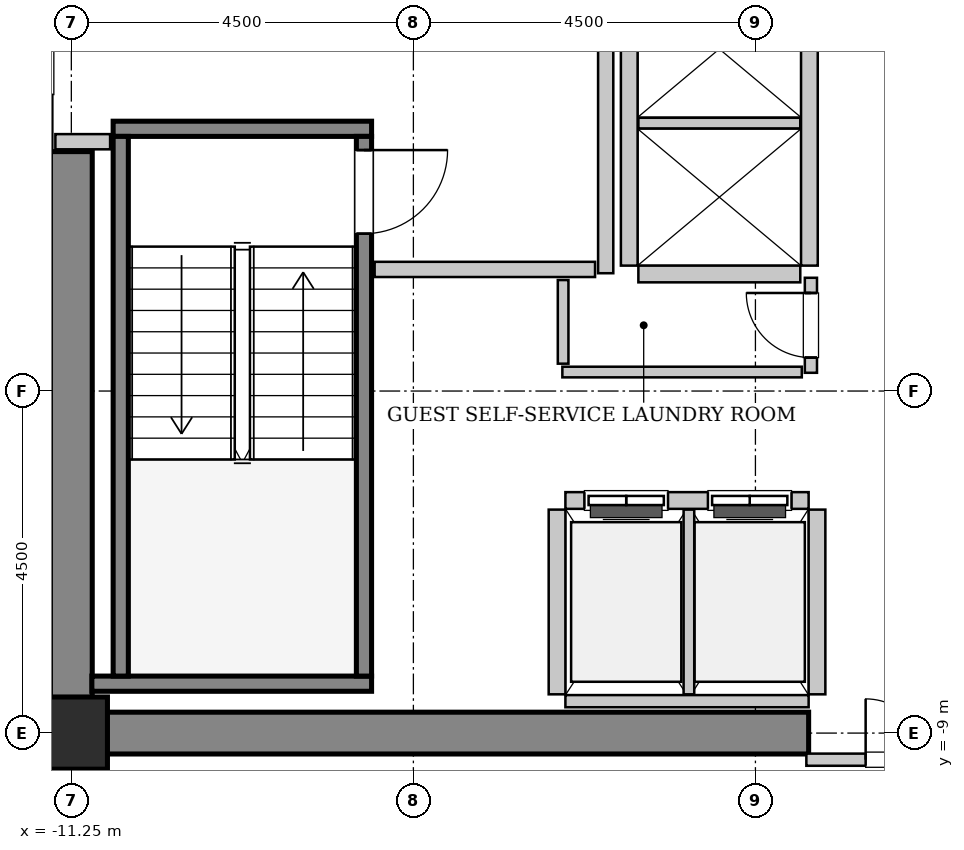
"""IFC4 building model, lengths in metres.
Left out: names, types, materials, properties, quantities, classifications, styles, units other than length and angle.
Written with IfcOpenShell. Run it as: python <this file> out.ifc"""

import sys

from ifc_helpers import new_model, si_unit, direction, frame, frame_2d, origin, origin_2d, place, context, subcontext, project, spatial, rectangle, hollow_rectangle, extrude, source, transform, mapped, element, fill, save


model = new_model("IFC4")
c1 = context("Model", 3, precision=1e-05, world=origin(), true_north=direction((0.0, 1.0)))
c2 = subcontext(c1, "Body", "Model", "MODEL_VIEW")
j1 = project(units=[si_unit("LENGTHUNIT", "METRE"), si_unit("PLANEANGLEUNIT", "RADIAN")], contexts=[c1])
p1 = place(None, origin())
s1 = spatial("IfcSite", under=j1, at=p1, CompositionType="ELEMENT")
p2 = place(p1, origin())
s2 = spatial("IfcBuilding", under=s1, at=p2, CompositionType="ELEMENT")
p3 = place(p2, frame((0.0, 0.0, 183.0)))
s3 = spatial("IfcBuildingStorey", under=s2, at=p3, CompositionType="ELEMENT", Elevation=183.0)
m1 = source(origin(), c2, "Body", "SweptSolid", [
    extrude(rectangle(XDim=9.975, YDim=0.55, at=frame_2d((4.987, 0.0))), origin(), (0.0, 0.0, 1.0), 3.8),
])
p4 = place(p3, frame((-11.525, -9.0, 0.0), z_axis=(0.0, 0.0, 1.0), x_axis=(1.0, 0.0, 0.0)))
e1 = element("IfcWall", 1, at=p4, inside=s3, PredefinedType="SHEAR", context=c2, shape_type="MappedRepresentation", body=[
    mapped(m1, transform((0.0, 0.0, 0.0), x_axis=(1.0, 0.0, 0.0), y_axis=(0.0, 1.0, 0.0), z_axis=(0.0, 0.0, 1.0), scale=1.0)),
])
m2 = source(origin(), c2, "Body", "SweptSolid", [
    extrude(rectangle(XDim=7.375, YDim=0.55, at=frame_2d((3.688, 0.0))), origin(), (0.0, 0.0, 1.0), 3.8),
])
p5 = place(p3, frame((-11.25, -8.725, 0.0), z_axis=(0.0, 0.0, 1.0), x_axis=(0.0, 1.0, 0.0)))
e2 = element("IfcWall", 2, at=p5, inside=s3, PredefinedType="SHEAR", context=c2, shape_type="MappedRepresentation", body=[
    mapped(m2, transform((0.0, 0.0, 0.0), x_axis=(1.0, 0.0, 0.0), y_axis=(0.0, 1.0, 0.0), z_axis=(0.0, 0.0, 1.0), scale=1.0)),
])
m3 = source(origin(), c2, "Body", "SweptSolid", [
    extrude(hollow_rectangle(XDim=0.95, YDim=0.95, WallThickness=0.045, InnerFilletRadius=0.045, OuterFilletRadius=0.09, at=origin_2d()), origin(), (0.0, 0.0, 1.0), 3.8),
])
p6 = place(p3, frame((-11.25, -9.0, 0.0), z_axis=(0.0, 0.0, 1.0), x_axis=(1.0, 0.0, 0.0)))
e3 = element("IfcColumn", 3, at=p6, inside=s3, PredefinedType="COLUMN", context=c2, shape_type="MappedRepresentation", body=[
    mapped(m3, transform((0.0, 0.0, 0.0), x_axis=(1.0, 0.0, 0.0), y_axis=(0.0, 1.0, 0.0), z_axis=(0.0, 0.0, 1.0), scale=1.0)),
])
m4 = source(origin(), c2, "Body", "SweptSolid", [
    extrude(rectangle(XDim=3.4, YDim=0.2, at=frame_2d((1.7, 0.0))), origin(), (0.0, 0.0, 1.0), 3.8),
])
p7 = place(p3, frame((-10.7, -1.05, 0.0), z_axis=(0.0, 0.0, 1.0), x_axis=(1.0, 0.0, 0.0)))
e4 = element("IfcWall", 4, at=p7, inside=s3, PredefinedType="SOLIDWALL", context=c2, shape_type="MappedRepresentation", body=[
    mapped(m4, transform((0.0, 0.0, 0.0), x_axis=(1.0, 0.0, 0.0), y_axis=(0.0, 1.0, 0.0), z_axis=(0.0, 0.0, 1.0), scale=1.0)),
])
m5 = source(origin(), c2, "Body", "SweptSolid", [
    extrude(rectangle(XDim=3.68, YDim=0.2, at=frame_2d((1.84, 0.0))), origin(), (0.0, 0.0, 1.0), 3.8),
])
p8 = place(p3, frame((-10.98, -8.35, 0.0), z_axis=(0.0, 0.0, 1.0), x_axis=(1.0, 0.0, 0.0)))
e5 = element("IfcWall", 5, at=p8, inside=s3, PredefinedType="SOLIDWALL", context=c2, shape_type="MappedRepresentation", body=[
    mapped(m5, transform((0.0, 0.0, 0.0), x_axis=(1.0, 0.0, 0.0), y_axis=(0.0, 1.0, 0.0), z_axis=(0.0, 0.0, 1.0), scale=1.0)),
])
m6 = source(origin(), c2, "Body", "SweptSolid", [
    extrude(rectangle(XDim=7.1, YDim=0.2, at=frame_2d((3.55, 0.0))), origin(), (0.0, 0.0, 1.0), 3.8),
])
p9 = place(p3, frame((-10.6, -1.15, 0.0), z_axis=(0.0, 0.0, 1.0), x_axis=(0.0, -1.0, 0.0)))
e6 = element("IfcWall", 6, at=p9, inside=s3, PredefinedType="SOLIDWALL", context=c2, shape_type="MappedRepresentation", body=[
    mapped(m6, transform((0.0, 0.0, 0.0), x_axis=(1.0, 0.0, 0.0), y_axis=(0.0, 1.0, 0.0), z_axis=(0.0, 0.0, 1.0), scale=1.0)),
])
p10 = place(p3, frame((-7.4, -1.15, 0.0), z_axis=(0.0, 0.0, 1.0), x_axis=(0.0, -1.0, 0.0)))
e7 = element("IfcWall", 7, at=p10, inside=s3, PredefinedType="SOLIDWALL", context=c2, shape_type="MappedRepresentation", body=[
    mapped(m6, transform((0.0, 0.0, 0.0), x_axis=(1.0, 0.0, 0.0), y_axis=(0.0, 1.0, 0.0), z_axis=(0.0, 0.0, 1.0), scale=1.0)),
])
p11 = place(p10, frame((0.18, 0.0, 0.0)))
e8 = element("IfcOpeningElement", 8, at=p11, cuts=e7, PredefinedType="OPENING", context=c2, shape_type="SweptSolid", body=[
    extrude(rectangle(XDim=1.1, YDim=2.15, at=frame_2d((0.55, 1.075))), frame((0.0, 0.11, 0.0), z_axis=(0.0, -1.0, 0.0), x_axis=(1.0, 0.0, 0.0)), (0.0, 0.0, 1.0), 0.22),
])
m7 = source(origin(), c2, "Body", "SweptSolid", [
    extrude(rectangle(XDim=3.2, YDim=0.22, at=frame_2d((1.6, 0.0))), origin(), (0.0, 0.0, 1.0), 3.535),
])
p12 = place(p3, frame((-1.55, -5.94, 0.0), z_axis=(0.0, 0.0, 1.0), x_axis=(-1.0, 0.0, 0.0)))
e9 = element("IfcWall", 9, at=p12, inside=s3, PredefinedType="SOLIDWALL", context=c2, shape_type="MappedRepresentation", body=[
    mapped(m7, transform((0.0, 0.0, 0.0), x_axis=(1.0, 0.0, 0.0), y_axis=(0.0, 1.0, 0.0), z_axis=(0.0, 0.0, 1.0), scale=1.0)),
])
p13 = place(p12, frame((1.85, 0.0, 0.0)))
e10 = element("IfcOpeningElement", 10, at=p13, cuts=e9, PredefinedType="OPENING", context=c2, shape_type="SweptSolid", body=[
    extrude(rectangle(XDim=1.1, YDim=2.2, at=frame_2d((0.55, 1.1))), frame((0.0, 0.12, 0.0), z_axis=(0.0, -1.0, 0.0), x_axis=(1.0, 0.0, 0.0)), (0.0, 0.0, 1.0), 0.24),
])
p14 = place(p12, frame((0.225, 0.0, 0.0)))
e11 = element("IfcOpeningElement", 11, at=p14, cuts=e9, PredefinedType="OPENING", context=c2, shape_type="SweptSolid", body=[
    extrude(rectangle(XDim=1.1, YDim=2.2, at=frame_2d((0.55, 1.1))), frame((0.0, 0.12, 0.0), z_axis=(0.0, -1.0, 0.0), x_axis=(1.0, 0.0, 0.0)), (0.0, 0.0, 1.0), 0.24),
])
m8 = source(origin(), c2, "Body", "SweptSolid", [
    extrude(rectangle(XDim=3.2, YDim=0.16, at=frame_2d((1.6, 0.0))), origin(), (0.0, 0.0, 1.0), 2.425),
])
p15 = place(p3, frame((-4.75, -8.58, 0.0), z_axis=(0.0, 0.0, 1.0), x_axis=(1.0, 0.0, 0.0)))
e12 = element("IfcWall", 12, at=p15, inside=s3, PredefinedType="PARTITIONING", context=c2, shape_type="MappedRepresentation", body=[
    mapped(m8, transform((0.0, 0.0, 0.0), x_axis=(1.0, 0.0, 0.0), y_axis=(0.0, 1.0, 0.0), z_axis=(0.0, 0.0, 1.0), scale=1.0)),
])
m9 = source(origin(), c2, "Body", "SweptSolid", [
    extrude(rectangle(XDim=2.43, YDim=0.22, at=frame_2d((1.215, 0.0))), origin(), (0.0, 0.0, 1.0), 3.535),
])
p16 = place(p3, frame((-4.86, -6.06, 0.0), z_axis=(0.0, 0.0, 1.0), x_axis=(0.0, -1.0, 0.0)))
e13 = element("IfcWall", 13, at=p16, inside=s3, PredefinedType="SOLIDWALL", context=c2, shape_type="MappedRepresentation", body=[
    mapped(m9, transform((0.0, 0.0, 0.0), x_axis=(1.0, 0.0, 0.0), y_axis=(0.0, 1.0, 0.0), z_axis=(0.0, 0.0, 1.0), scale=1.0)),
])
m10 = source(origin(), c2, "Body", "SweptSolid", [
    extrude(rectangle(XDim=2.43, YDim=0.14, at=frame_2d((1.215, 0.0))), origin(), (0.0, 0.0, 1.0), 3.535),
])
p17 = place(p3, frame((-3.125, -8.49, 0.0), z_axis=(0.0, 0.0, 1.0), x_axis=(0.0, 1.0, 0.0)))
e14 = element("IfcWall", 14, at=p17, inside=s3, PredefinedType="PARTITIONING", context=c2, shape_type="MappedRepresentation", body=[
    mapped(m10, transform((0.0, 0.0, 0.0), x_axis=(1.0, 0.0, 0.0), y_axis=(0.0, 1.0, 0.0), z_axis=(0.0, 0.0, 1.0), scale=1.0)),
])
p18 = place(p3, frame((-1.44, -8.49, 0.0), z_axis=(0.0, 0.0, 1.0), x_axis=(0.0, 1.0, 0.0)))
e15 = element("IfcWall", 15, at=p18, inside=s3, PredefinedType="SOLIDWALL", context=c2, shape_type="MappedRepresentation", body=[
    mapped(m9, transform((0.0, 0.0, 0.0), x_axis=(1.0, 0.0, 0.0), y_axis=(0.0, 1.0, 0.0), z_axis=(0.0, 0.0, 1.0), scale=1.0)),
])
m11 = source(origin(), c2, "Body", "SweptSolid", [
    extrude(rectangle(XDim=5.7, YDim=0.22, at=frame_2d((2.85, 0.0))), origin(), (0.0, 0.0, 1.0), 3.535),
])
for number, where, z_axis, x_axis in (
    (16, (-1.54, -2.85, 0.0), (0.0, 0.0, 1.0), (0.0, 1.0, 0.0)),
    (17, (-3.91, 2.85, 0.0), (0.0, 0.0, 1.0), (0.0, -1.0, 0.0)),
):
    element("IfcWall", number, at=place(p3, frame(where, z_axis=z_axis, x_axis=x_axis)), inside=s3, PredefinedType="SOLIDWALL", context=c2, shape_type="MappedRepresentation", body=[
        mapped(m11, transform((0.0, 0.0, 0.0), x_axis=(1.0, 0.0, 0.0), y_axis=(0.0, 1.0, 0.0), z_axis=(0.0, 0.0, 1.0), scale=1.0)),
    ])
m12 = source(origin(), c2, "Body", "SweptSolid", [
    extrude(rectangle(XDim=2.13, YDim=0.22, at=frame_2d((1.065, 0.0))), origin(), (0.0, 0.0, 1.0), 3.535),
])
p19 = place(p3, frame((-3.79, -2.96, 0.0), z_axis=(0.0, 0.0, 1.0), x_axis=(1.0, 0.0, 0.0)))
e18 = element("IfcWall", 18, at=p19, inside=s3, PredefinedType="SOLIDWALL", context=c2, shape_type="MappedRepresentation", body=[
    mapped(m12, transform((0.0, 0.0, 0.0), x_axis=(1.0, 0.0, 0.0), y_axis=(0.0, 1.0, 0.0), z_axis=(0.0, 0.0, 1.0), scale=1.0)),
])
m13 = source(origin(), c2, "Body", "SweptSolid", [
    extrude(rectangle(XDim=2.13, YDim=0.14, at=frame_2d((1.065, 0.0))), origin(), (0.0, 0.0, 1.0), 3.535),
])
p20 = place(p3, frame((-3.79, -0.975, 0.0), z_axis=(0.0, 0.0, 1.0), x_axis=(1.0, 0.0, 0.0)))
e19 = element("IfcWall", 19, at=p20, inside=s3, PredefinedType="PARTITIONING", context=c2, shape_type="MappedRepresentation", body=[
    mapped(m13, transform((0.0, 0.0, 0.0), x_axis=(1.0, 0.0, 0.0), y_axis=(0.0, 1.0, 0.0), z_axis=(0.0, 0.0, 1.0), scale=1.0)),
])
m14 = source(origin(), c2, "Body", "SweptSolid", [
    extrude(rectangle(XDim=5.9, YDim=0.2, at=frame_2d((2.95, 0.0))), origin(), (0.0, 0.0, 1.0), 3.535),
])
p21 = place(p3, frame((-4.22, -2.95, 0.0), z_axis=(0.0, 0.0, 1.0), x_axis=(0.0, 1.0, 0.0)))
e20 = element("IfcWall", 20, at=p21, inside=s3, PredefinedType="PARTITIONING", context=c2, shape_type="MappedRepresentation", body=[
    mapped(m14, transform((0.0, 0.0, 0.0), x_axis=(1.0, 0.0, 0.0), y_axis=(0.0, 1.0, 0.0), z_axis=(0.0, 0.0, 1.0), scale=1.0)),
])
m15 = source(origin(), c2, "Body", "SweptSolid", [
    extrude(rectangle(XDim=2.9, YDim=0.2, at=frame_2d((1.45, 0.0))), origin(), (0.0, 0.0, 1.0), 3.535),
])
p22 = place(p3, frame((-7.26, -2.9, 0.0), z_axis=(0.0, 0.0, 1.0), x_axis=(1.0, 0.0, 0.0)))
e21 = element("IfcWall", 21, at=p22, inside=s3, PredefinedType="PARTITIONING", context=c2, shape_type="MappedRepresentation", body=[
    mapped(m15, transform((0.0, 0.0, 0.0), x_axis=(1.0, 0.0, 0.0), y_axis=(0.0, 1.0, 0.0), z_axis=(0.0, 0.0, 1.0), scale=1.0)),
])
m16 = source(origin(), c2, "Body", "SweptSolid", [
    extrude(rectangle(XDim=0.72, YDim=0.2, at=frame_2d((0.36, 0.0))), origin(), (0.0, 0.0, 1.0), 3.535),
])
p23 = place(p3, frame((-11.46, -1.22, 0.0), z_axis=(0.0, 0.0, 1.0), x_axis=(1.0, 0.0, 0.0)))
e22 = element("IfcWall", 22, at=p23, inside=s3, PredefinedType="PARTITIONING", context=c2, shape_type="MappedRepresentation", body=[
    mapped(m16, transform((0.0, 0.0, 0.0), x_axis=(1.0, 0.0, 0.0), y_axis=(0.0, 1.0, 0.0), z_axis=(0.0, 0.0, 1.0), scale=1.0)),
])
m17 = source(origin(), c2, "Body", "SweptSolid", [
    extrude(rectangle(XDim=3.16, YDim=0.16, at=frame_2d((1.58, 0.0))), origin(), (0.0, 0.0, 1.0), 2.425),
])
p24 = place(p3, frame((-1.58, -9.35, 0.0), z_axis=(0.0, 0.0, 1.0), x_axis=(1.0, 0.0, 0.0)))
e23 = element("IfcWall", 23, at=p24, inside=s3, PredefinedType="PARTITIONING", context=c2, shape_type="MappedRepresentation", body=[
    mapped(m17, transform((0.0, 0.0, 0.0), x_axis=(1.0, 0.0, 0.0), y_axis=(0.0, 1.0, 0.0), z_axis=(0.0, 0.0, 1.0), scale=1.0)),
])
p25 = place(p24, frame((0.78, 0.0, 0.0)))
e24 = element("IfcOpeningElement", 24, at=p25, cuts=e23, PredefinedType="OPENING", context=c2, shape_type="SweptSolid", body=[
    extrude(rectangle(XDim=1.6, YDim=2.3, at=frame_2d((0.8, 1.15))), frame((0.0, 0.09, 0.0), z_axis=(0.0, -1.0, 0.0), x_axis=(1.0, 0.0, 0.0)), (0.0, 0.0, 1.0), 0.18),
])
m18 = source(origin(), c2, "Body", "SweptSolid", [
    extrude(rectangle(XDim=1.25, YDim=0.16, at=frame_2d((0.625, 0.0))), origin(), (0.0, 0.0, 1.0), 3.535),
])
p26 = place(p3, frame((-1.52, -4.26, 0.0), z_axis=(0.0, 0.0, 1.0), x_axis=(0.0, 1.0, 0.0)))
e25 = element("IfcWall", 25, at=p26, inside=s3, PredefinedType="PARTITIONING", context=c2, shape_type="MappedRepresentation", body=[
    mapped(m18, transform((0.0, 0.0, 0.0), x_axis=(1.0, 0.0, 0.0), y_axis=(0.0, 1.0, 0.0), z_axis=(0.0, 0.0, 1.0), scale=1.0)),
])
p27 = place(p26, frame((0.2, 0.0, 0.0)))
e26 = element("IfcOpeningElement", 26, at=p27, cuts=e25, PredefinedType="OPENING", context=c2, shape_type="SweptSolid", body=[
    extrude(rectangle(XDim=0.85, YDim=2.1, at=frame_2d((0.425, 1.05))), frame((0.0, 0.09, 0.0), z_axis=(0.0, -1.0, 0.0), x_axis=(1.0, 0.0, 0.0)), (0.0, 0.0, 1.0), 0.18),
])
m19 = source(origin(), c2, "Body", "SweptSolid", [
    extrude(rectangle(XDim=3.15, YDim=0.14, at=frame_2d((1.575, 0.0))), origin(), (0.0, 0.0, 1.0), 3.535),
])
p28 = place(p3, frame((-4.79, -4.25, 0.0), z_axis=(0.0, 0.0, 1.0), x_axis=(1.0, 0.0, 0.0)))
e27 = element("IfcWall", 27, at=p28, inside=s3, PredefinedType="PARTITIONING", context=c2, shape_type="MappedRepresentation", body=[
    mapped(m19, transform((0.0, 0.0, 0.0), x_axis=(1.0, 0.0, 0.0), y_axis=(0.0, 1.0, 0.0), z_axis=(0.0, 0.0, 1.0), scale=1.0)),
])
m20 = source(origin(), c2, "Body", "SweptSolid", [
    extrude(rectangle(XDim=1.1, YDim=0.14, at=frame_2d((0.55, 0.0))), origin(), (0.0, 0.0, 1.0), 3.535),
])
p29 = place(p3, frame((-4.78, -4.14, 0.0), z_axis=(0.0, 0.0, 1.0), x_axis=(0.0, 1.0, 0.0)))
e28 = element("IfcWall", 28, at=p29, inside=s3, PredefinedType="PARTITIONING", context=c2, shape_type="MappedRepresentation", body=[
    mapped(m20, transform((0.0, 0.0, 0.0), x_axis=(1.0, 0.0, 0.0), y_axis=(0.0, 1.0, 0.0), z_axis=(0.0, 0.0, 1.0), scale=1.0)),
])
m21 = source(origin(), c2, "Body", "SweptSolid", [
    extrude(rectangle(XDim=1.1, YDim=2.15, at=frame_2d((0.55, 1.075))), frame((0.0, 0.025, 0.0), z_axis=(0.0, -1.0, 0.0), x_axis=(1.0, 0.0, 0.0)), (0.0, 0.0, 1.0), 0.05),
])
p30 = place(p11, origin())
e29 = element("IfcDoor", 29, at=p30, inside=s3, OperationType="SINGLE_SWING_LEFT", PredefinedType="DOOR", context=c2, shape_type="MappedRepresentation", body=[
    mapped(m21, transform((0.0, 0.0, 0.0), x_axis=(1.0, 0.0, 0.0), y_axis=(0.0, 1.0, 0.0), z_axis=(0.0, 0.0, 1.0), scale=1.0)),
])
fill(e8, e29)
m22 = source(origin(), c2, "Body", "SweptSolid", [
    extrude(rectangle(XDim=1.1, YDim=2.2, at=frame_2d((0.55, 1.1))), frame((0.0, 0.025, 0.0), z_axis=(0.0, -1.0, 0.0), x_axis=(1.0, 0.0, 0.0)), (0.0, 0.0, 1.0), 0.05),
])
p31 = place(p13, origin())
e30 = element("IfcDoor", 30, at=p31, inside=s3, OperationType="DOUBLE_DOOR_SLIDING", PredefinedType="DOOR", context=c2, shape_type="MappedRepresentation", body=[
    mapped(m22, transform((0.0, 0.0, 0.0), x_axis=(1.0, 0.0, 0.0), y_axis=(0.0, 1.0, 0.0), z_axis=(0.0, 0.0, 1.0), scale=1.0)),
])
fill(e10, e30)
p32 = place(p14, origin())
e31 = element("IfcDoor", 31, at=p32, inside=s3, OperationType="DOUBLE_DOOR_SLIDING", PredefinedType="DOOR", context=c2, shape_type="MappedRepresentation", body=[
    mapped(m22, transform((0.0, 0.0, 0.0), x_axis=(1.0, 0.0, 0.0), y_axis=(0.0, 1.0, 0.0), z_axis=(0.0, 0.0, 1.0), scale=1.0)),
])
fill(e11, e31)
m23 = source(origin(), c2, "Body", "SweptSolid", [
    extrude(rectangle(XDim=1.6, YDim=2.3, at=frame_2d((0.8, 1.15))), frame((0.0, 0.025, 0.0), z_axis=(0.0, -1.0, 0.0), x_axis=(1.0, 0.0, 0.0)), (0.0, 0.0, 1.0), 0.05),
])
p33 = place(p25, origin())
e32 = element("IfcDoor", 32, at=p33, inside=s3, OperationType="DOUBLE_DOOR_SINGLE_SWING", PredefinedType="DOOR", context=c2, shape_type="MappedRepresentation", body=[
    mapped(m23, transform((0.0, 0.0, 0.0), x_axis=(1.0, 0.0, 0.0), y_axis=(0.0, 1.0, 0.0), z_axis=(0.0, 0.0, 1.0), scale=1.0)),
])
fill(e24, e32)
m24 = source(origin(), c2, "Body", "SweptSolid", [
    extrude(rectangle(XDim=0.85, YDim=2.1, at=frame_2d((0.425, 1.05))), frame((0.0, 0.025, 0.0), z_axis=(0.0, -1.0, 0.0), x_axis=(1.0, 0.0, 0.0)), (0.0, 0.0, 1.0), 0.05),
])
p34 = place(p27, origin())
e33 = element("IfcDoor", 33, at=p34, inside=s3, OperationType="SINGLE_SWING_RIGHT", PredefinedType="DOOR", context=c2, shape_type="MappedRepresentation", body=[
    mapped(m24, transform((0.0, 0.0, 0.0), x_axis=(1.0, 0.0, 0.0), y_axis=(0.0, 1.0, 0.0), z_axis=(0.0, 0.0, 1.0), scale=1.0)),
])
fill(e26, e33)
save(model, sys.argv[1])
